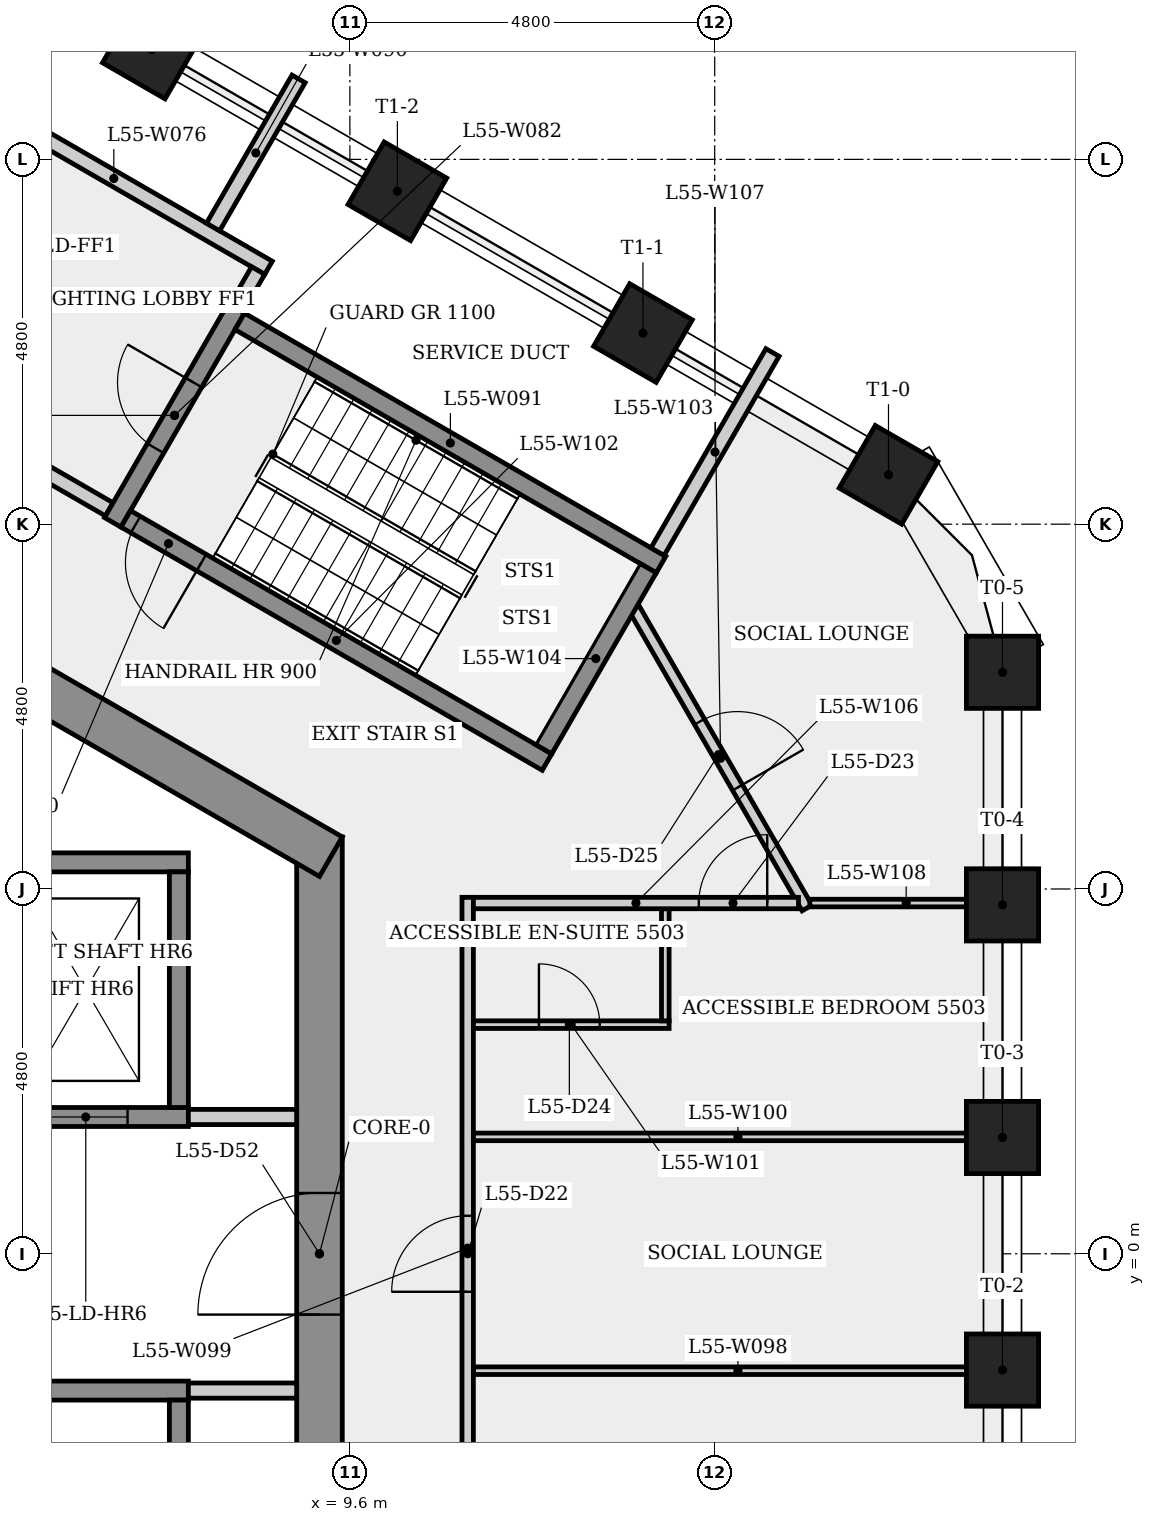
"""IFC4 building model, lengths in metres.
Left out: names, types, materials, properties, quantities, classifications, styles, units other than length and angle.
Written with IfcOpenShell. Run it as: python <this file> out.ifc"""

import sys

from ifc_helpers import new_model, si_unit, direction, frame, frame_2d, origin, origin_2d, place, context, subcontext, project, spatial, rectangle, extrude, element, fill, save


model = new_model("IFC4")
c1 = context("Model", 3, precision=1e-05, world=origin(), true_north=direction((0.0, 1.0)))
c2 = subcontext(c1, "Body", "Model", "MODEL_VIEW")
j1 = project(units=[si_unit("LENGTHUNIT", "METRE"), si_unit("PLANEANGLEUNIT", "RADIAN")], contexts=[c1])
p1 = place(None, origin())
s1 = spatial("IfcSite", under=j1, at=p1, CompositionType="ELEMENT")
p2 = place(p1, origin())
s2 = spatial("IfcBuilding", under=s1, at=p2, CompositionType="ELEMENT")
p3 = place(p2, frame((0.0, 0.0, 206.1)))
s3 = spatial("IfcBuildingStorey", under=s2, at=p3, CompositionType="ELEMENT", Elevation=206.1)
p4 = place(p3, frame((9.2, -5.485, 0.0), z_axis=(0.0, 0.0, 1.0), x_axis=(0.0, 1.0, 0.0)))
e1 = element("IfcWall", 1, at=p4, inside=s3, PredefinedType="SHEAR", context=c2, shape_type="SweptSolid", body=[
    extrude(rectangle(XDim=10.97, YDim=0.6, at=frame_2d((5.485, 0.0))), origin(), (0.0, 0.0, 1.0), 4.0),
])
p5 = place(p4, frame((4.685, 0.0, 0.0)))
e2 = element("IfcOpeningElement", 2, at=p5, cuts=e1, PredefinedType="OPENING", context=c2, shape_type="SweptSolid", body=[
    extrude(rectangle(XDim=1.6, YDim=2.1, at=frame_2d((0.8, 1.05))), frame((0.0, 0.31, 0.0), z_axis=(0.0, -1.0, 0.0), x_axis=(1.0, 0.0, 0.0)), (0.0, 0.0, 1.0), 0.62),
])
p6 = place(p3, frame((9.35, 5.225, 0.0), z_axis=(0.0, 0.0, 1.0), x_axis=(-0.866023993627, 0.500002442456, 0.0)))
e3 = element("IfcWall", 3, at=p6, inside=s3, PredefinedType="SHEAR", context=c2, shape_type="SweptSolid", body=[
    extrude(rectangle(XDim=10.97, YDim=0.6, at=frame_2d((5.485, 0.0))), origin(), (0.0, 0.0, 1.0), 4.0),
])
p7 = place(p6, frame((5.393, 0.0, 0.0)))
e4 = element("IfcOpeningElement", 4, at=p7, cuts=e3, PredefinedType="OPENING", context=c2, shape_type="SweptSolid", body=[
    extrude(rectangle(XDim=0.9, YDim=2.1, at=frame_2d((0.45, 1.05))), frame((0.0, 0.31, 0.0), z_axis=(0.0, -1.0, 0.0), x_axis=(1.0, 0.0, 0.0)), (0.0, 0.0, 1.0), 0.62),
])
for number, where, z_axis, x_axis in (
    (5, (18.187, -1.53, 0.0), (0.0, 0.0, 1.0), (1.0, 0.0, 0.0)),
    (6, (18.187, 1.53, 0.0), (0.0, 0.0, 1.0), (1.0, 0.0, 0.0)),
    (7, (18.187, 4.591, 0.0), (0.0, 0.0, 1.0), (1.0, 0.0, 0.0)),
    (8, (18.187, 7.651, 0.0), (0.0, 0.0, 1.0), (1.0, 0.0, 0.0)),
    (9, (16.687, 10.25, 0.0), (0.0, 0.0, 1.0), (0.5, 0.866, 0.0)),
    (10, (13.456, 12.115, 0.0), (0.0, 0.0, 1.0), (0.5, 0.866, 0.0)),
    (11, (10.225, 13.98, 0.0), (0.0, 0.0, 1.0), (0.5, 0.866, 0.0)),
    (12, (6.994, 15.845, 0.0), (0.0, 0.0, 1.0), (0.5, 0.866, 0.0)),
):
    element("IfcColumn", number, at=place(p3, frame(where, z_axis=z_axis, x_axis=x_axis)), inside=s3, PredefinedType="COLUMN", context=c2, shape_type="SweptSolid", body=[
        extrude(rectangle(XDim=0.95, YDim=0.95, at=origin_2d()), origin(), (0.0, 0.0, 1.0), 4.0),
    ])
p8 = place(p3, frame((-7.475, 1.8, 0.0), z_axis=(0.0, 0.0, 1.0), x_axis=(1.0, 0.0, 0.0)))
e13 = element("IfcWall", 13, at=p8, inside=s3, PredefinedType="SHEAR", context=c2, shape_type="SweptSolid", body=[
    extrude(rectangle(XDim=14.95, YDim=0.25, at=frame_2d((7.475, 0.0))), origin(), (0.0, 0.0, 1.0), 3.6),
])
p9 = place(p8, frame((0.8, 0.0, 0.0)))
e14 = element("IfcOpeningElement", 14, at=p9, cuts=e13, PredefinedType="OPENING", context=c2, shape_type="SweptSolid", body=[
    extrude(rectangle(XDim=1.1, YDim=2.1, at=frame_2d((0.55, 1.05))), frame((0.0, 0.135, 0.0), z_axis=(0.0, -1.0, 0.0), x_axis=(1.0, 0.0, 0.0)), (0.0, 0.0, 1.0), 0.27),
])
p10 = place(p8, frame((3.25, 0.0, 0.0)))
e15 = element("IfcOpeningElement", 15, at=p10, cuts=e13, PredefinedType="OPENING", context=c2, shape_type="SweptSolid", body=[
    extrude(rectangle(XDim=1.1, YDim=2.1, at=frame_2d((0.55, 1.05))), frame((0.0, 0.135, 0.0), z_axis=(0.0, -1.0, 0.0), x_axis=(1.0, 0.0, 0.0)), (0.0, 0.0, 1.0), 0.27),
])
p11 = place(p8, frame((5.7, 0.0, 0.0)))
e16 = element("IfcOpeningElement", 16, at=p11, cuts=e13, PredefinedType="OPENING", context=c2, shape_type="SweptSolid", body=[
    extrude(rectangle(XDim=1.1, YDim=2.1, at=frame_2d((0.55, 1.05))), frame((0.0, 0.135, 0.0), z_axis=(0.0, -1.0, 0.0), x_axis=(1.0, 0.0, 0.0)), (0.0, 0.0, 1.0), 0.27),
])
p12 = place(p8, frame((8.15, 0.0, 0.0)))
e17 = element("IfcOpeningElement", 17, at=p12, cuts=e13, PredefinedType="OPENING", context=c2, shape_type="SweptSolid", body=[
    extrude(rectangle(XDim=1.1, YDim=2.1, at=frame_2d((0.55, 1.05))), frame((0.0, 0.135, 0.0), z_axis=(0.0, -1.0, 0.0), x_axis=(1.0, 0.0, 0.0)), (0.0, 0.0, 1.0), 0.27),
])
p13 = place(p8, frame((10.6, 0.0, 0.0)))
e18 = element("IfcOpeningElement", 18, at=p13, cuts=e13, PredefinedType="OPENING", context=c2, shape_type="SweptSolid", body=[
    extrude(rectangle(XDim=1.1, YDim=2.1, at=frame_2d((0.55, 1.05))), frame((0.0, 0.135, 0.0), z_axis=(0.0, -1.0, 0.0), x_axis=(1.0, 0.0, 0.0)), (0.0, 0.0, 1.0), 0.27),
])
p14 = place(p8, frame((13.05, 0.0, 0.0)))
e19 = element("IfcOpeningElement", 19, at=p14, cuts=e13, PredefinedType="OPENING", context=c2, shape_type="SweptSolid", body=[
    extrude(rectangle(XDim=1.1, YDim=2.1, at=frame_2d((0.55, 1.05))), frame((0.0, 0.135, 0.0), z_axis=(0.0, -1.0, 0.0), x_axis=(1.0, 0.0, 0.0)), (0.0, 0.0, 1.0), 0.27),
])
p15 = place(p3, frame((-7.225, 5.15, 0.0), z_axis=(0.0, 0.0, 1.0), x_axis=(1.0, 0.0, 0.0)))
e20 = element("IfcWall", 20, at=p15, inside=s3, PredefinedType="SHEAR", context=c2, shape_type="SweptSolid", body=[
    extrude(rectangle(XDim=14.7, YDim=0.25, at=frame_2d((7.35, 0.0))), origin(), (0.0, 0.0, 1.0), 3.6),
])
p16 = place(p3, frame((4.459, 15.323, 0.0), z_axis=(0.0, 0.0, 1.0), x_axis=(0.866016039709, -0.500016218704, 0.0)))
e21 = element("IfcWall", 21, at=p16, inside=s3, PredefinedType="PLUMBINGWALL", context=c2, shape_type="SweptSolid", body=[
    extrude(rectangle(XDim=4.7, YDim=0.2, at=frame_2d((2.35, 0.0))), origin(), (0.0, 0.0, 1.0), 3.6),
])
p17 = place(p3, frame((2.575, -1.8, 0.0), z_axis=(0.0, 0.0, 1.0), x_axis=(1.0, 0.0, 0.0)))
e22 = element("IfcWall", 22, at=p17, inside=s3, PredefinedType="SHEAR", context=c2, shape_type="SweptSolid", body=[
    extrude(rectangle(XDim=4.9, YDim=0.25, at=frame_2d((2.45, 0.0))), origin(), (0.0, 0.0, 1.0), 3.6),
])
p18 = place(p17, frame((0.597, 0.0, 0.0)))
e23 = element("IfcOpeningElement", 23, at=p18, cuts=e22, PredefinedType="OPENING", context=c2, shape_type="SweptSolid", body=[
    extrude(rectangle(XDim=1.1, YDim=2.1, at=frame_2d((0.55, 1.05))), frame((0.0, 0.135, 0.0), z_axis=(0.0, -1.0, 0.0), x_axis=(1.0, 0.0, 0.0)), (0.0, 0.0, 1.0), 0.27),
])
p19 = place(p3, frame((6.435, 9.795, 0.0), z_axis=(0.0, 0.0, 1.0), x_axis=(-0.866012907634, 0.500021643343, 0.0)))
e24 = element("IfcWall", 24, at=p19, inside=s3, PredefinedType="PARTITIONING", context=c2, shape_type="SweptSolid", body=[
    extrude(rectangle(XDim=4.45, YDim=0.2, at=frame_2d((2.225, 0.0))), origin(), (0.0, 0.0, 1.0), 3.6),
])
p20 = place(p19, frame((1.675, 0.0, 0.0)))
e25 = element("IfcOpeningElement", 25, at=p20, cuts=e24, PredefinedType="OPENING", context=c2, shape_type="SweptSolid", body=[
    extrude(rectangle(XDim=1.1, YDim=2.1, at=frame_2d((0.55, 1.05))), frame((0.0, 0.11, 0.0), z_axis=(0.0, -1.0, 0.0), x_axis=(1.0, 0.0, 0.0)), (0.0, 0.0, 1.0), 0.22),
])
p21 = place(p3, frame((6.48, 9.624, 0.0), z_axis=(0.0, 0.0, 1.0), x_axis=(0.500017246033, 0.866015446554, 0.0)))
e26 = element("IfcWall", 26, at=p21, inside=s3, PredefinedType="SHEAR", context=c2, shape_type="SweptSolid", body=[
    extrude(rectangle(XDim=3.25, YDim=0.25, at=frame_2d((1.625, 0.0))), origin(), (0.0, 0.0, 1.0), 3.6),
])
p22 = place(p21, frame((1.125, 0.0, 0.0)))
e27 = element("IfcOpeningElement", 27, at=p22, cuts=e26, PredefinedType="OPENING", context=c2, shape_type="SweptSolid", body=[
    extrude(rectangle(XDim=1.0, YDim=2.1, at=frame_2d((0.5, 1.05))), frame((0.0, 0.135, 0.0), z_axis=(0.0, -1.0, 0.0), x_axis=(1.0, 0.0, 0.0)), (0.0, 0.0, 1.0), 0.27),
])
p23 = place(p3, frame((7.475, 1.8, 0.0), z_axis=(0.0, 0.0, 1.0), x_axis=(1.0, 0.0, 0.0)))
e28 = element("IfcWall", 28, at=p23, inside=s3, PredefinedType="PARTITIONING", context=c2, shape_type="SweptSolid", body=[
    extrude(rectangle(XDim=1.425, YDim=0.2, at=frame_2d((0.712, 0.0))), origin(), (0.0, 0.0, 1.0), 3.6),
])
for number, where, z_axis, x_axis in (
    (29, (7.35, -1.925, 0.0), (0.0, 0.0, 1.0), (0.0, -1.0, 0.0)),
    (30, (7.35, 5.025, 0.0), (0.0, 0.0, 1.0), (0.0, -1.0, 0.0)),
):
    element("IfcWall", number, at=place(p3, frame(where, z_axis=z_axis, x_axis=x_axis)), inside=s3, PredefinedType="SHEAR", context=c2, shape_type="SweptSolid", body=[
        extrude(rectangle(XDim=3.1, YDim=0.25, at=frame_2d((1.55, 0.0))), origin(), (0.0, 0.0, 1.0), 4.0),
    ])
p24 = place(p3, frame((7.8, 13.51, 0.0), z_axis=(0.0, 0.0, 1.0), x_axis=(0.500001041529, 0.866024802457, 0.0)))
e31 = element("IfcWall", 31, at=p24, inside=s3, PredefinedType="PLUMBINGWALL", context=c2, shape_type="SweptSolid", body=[
    extrude(rectangle(XDim=2.25, YDim=0.2, at=frame_2d((1.125, 0.0))), origin(), (0.0, 0.0, 1.0), 3.6),
])
p25 = place(p3, frame((8.151, 12.268, 0.0), z_axis=(0.0, 0.0, 1.0), x_axis=(0.866025499775, -0.499999833739, 0.0)))
e32 = element("IfcWall", 32, at=p25, inside=s3, PredefinedType="SHEAR", context=c2, shape_type="SweptSolid", body=[
    extrude(rectangle(XDim=6.4, YDim=0.25, at=frame_2d((3.2, 0.0))), origin(), (0.0, 0.0, 1.0), 3.6),
])
p26 = place(p3, frame((8.393, 12.937, 0.0), z_axis=(0.0, 0.0, 1.0), x_axis=(-0.500065409566, -0.86598763626, 0.0)))
e33 = element("IfcWall", 33, at=p26, inside=s3, PredefinedType="PLUMBINGWALL", context=c2, shape_type="SweptSolid", body=[
    extrude(rectangle(XDim=0.575, YDim=0.2, at=frame_2d((0.288, 0.0))), origin(), (0.0, 0.0, 1.0), 3.6),
])
p27 = place(p3, frame((8.9, -1.8, 0.0), z_axis=(0.0, 0.0, 1.0), x_axis=(-1.0, 0.0, 0.0)))
e34 = element("IfcWall", 34, at=p27, inside=s3, PredefinedType="PARTITIONING", context=c2, shape_type="SweptSolid", body=[
    extrude(rectangle(XDim=1.425, YDim=0.2, at=frame_2d((0.712, 0.0))), origin(), (0.0, 0.0, 1.0), 3.6),
])
p28 = place(p3, frame((11.225, -1.538, 0.0), z_axis=(0.0, 0.0, 1.0), x_axis=(1.0, 0.0, 0.0)))
e35 = element("IfcWall", 35, at=p28, inside=s3, PredefinedType="PARTITIONING", context=c2, shape_type="SweptSolid", body=[
    extrude(rectangle(XDim=6.961, YDim=0.1, at=frame_2d((3.481, 0.0))), origin(), (0.0, 0.0, 1.0), 3.6),
])
p29 = place(p3, frame((11.15, -4.54, 0.0), z_axis=(0.0, 0.0, 1.0), x_axis=(0.0, 1.0, 0.0)))
e36 = element("IfcWall", 36, at=p29, inside=s3, PredefinedType="PARTITIONING", context=c2, shape_type="SweptSolid", body=[
    extrude(rectangle(XDim=9.23, YDim=0.15, at=frame_2d((4.615, 0.0))), origin(), (0.0, 0.0, 1.0), 3.6),
])
p30 = place(p29, frame((4.04, 0.0, 0.0)))
e37 = element("IfcOpeningElement", 37, at=p30, cuts=e36, PredefinedType="OPENING", context=c2, shape_type="SweptSolid", body=[
    extrude(rectangle(XDim=1.0, YDim=2.1, at=frame_2d((0.5, 1.05))), frame((0.0, 0.085, 0.0), z_axis=(0.0, -1.0, 0.0), x_axis=(1.0, 0.0, 0.0)), (0.0, 0.0, 1.0), 0.17),
])
p31 = place(p3, frame((11.225, 1.538, 0.0), z_axis=(0.0, 0.0, 1.0), x_axis=(1.0, 0.0, 0.0)))
e38 = element("IfcWall", 38, at=p31, inside=s3, PredefinedType="PARTITIONING", context=c2, shape_type="SweptSolid", body=[
    extrude(rectangle(XDim=6.961, YDim=0.1, at=frame_2d((3.481, 0.0))), origin(), (0.0, 0.0, 1.0), 3.6),
])
p32 = place(p3, frame((11.225, 3.015, 0.0), z_axis=(0.0, 0.0, 1.0), x_axis=(1.0, 0.0, 0.0)))
e39 = element("IfcWall", 39, at=p32, inside=s3, PredefinedType="PARTITIONING", context=c2, shape_type="SweptSolid", body=[
    extrude(rectangle(XDim=2.575, YDim=0.1, at=frame_2d((1.288, 0.0))), origin(), (0.0, 0.0, 1.0), 3.6),
])
p33 = place(p32, frame((0.863, 0.0, 0.0)))
e40 = element("IfcOpeningElement", 40, at=p33, cuts=e39, PredefinedType="OPENING", context=c2, shape_type="SweptSolid", body=[
    extrude(rectangle(XDim=0.8, YDim=2.1, at=frame_2d((0.4, 1.05))), frame((0.0, 0.06, 0.0), z_axis=(0.0, -1.0, 0.0), x_axis=(1.0, 0.0, 0.0)), (0.0, 0.0, 1.0), 0.12),
])
p34 = place(p3, frame((12.194, 6.47, 0.0), z_axis=(0.0, 0.0, 1.0), x_axis=(-0.866025499775, 0.499999833739, 0.0)))
e41 = element("IfcWall", 41, at=p34, inside=s3, PredefinedType="SHEAR", context=c2, shape_type="SweptSolid", body=[
    extrude(rectangle(XDim=6.4, YDim=0.25, at=frame_2d((3.2, 0.0))), origin(), (0.0, 0.0, 1.0), 3.6),
])
p35 = place(p34, frame((5.25, 0.0, 0.0)))
e42 = element("IfcOpeningElement", 42, at=p35, cuts=e41, PredefinedType="OPENING", context=c2, shape_type="SweptSolid", body=[
    extrude(rectangle(XDim=1.0, YDim=2.1, at=frame_2d((0.5, 1.05))), frame((0.0, 0.135, 0.0), z_axis=(0.0, -1.0, 0.0), x_axis=(1.0, 0.0, 0.0)), (0.0, 0.0, 1.0), 0.27),
])
p36 = place(p3, frame((13.34, 8.49, 0.0), z_axis=(0.0, 0.0, 1.0), x_axis=(0.499995010897, -0.866028284225, 0.0)))
e43 = element("IfcWall", 43, at=p36, inside=s3, PredefinedType="PARTITIONING", context=c2, shape_type="SweptSolid", body=[
    extrude(rectangle(XDim=4.549, YDim=0.15, at=frame_2d((2.274, 0.0))), origin(), (0.0, 0.0, 1.0), 3.6),
])
p37 = place(p36, frame((1.719, 0.0, 0.0)))
e44 = element("IfcOpeningElement", 44, at=p37, cuts=e43, PredefinedType="OPENING", context=c2, shape_type="SweptSolid", body=[
    extrude(rectangle(XDim=1.0, YDim=2.1, at=frame_2d((0.5, 1.05))), frame((0.0, 0.085, 0.0), z_axis=(0.0, -1.0, 0.0), x_axis=(1.0, 0.0, 0.0)), (0.0, 0.0, 1.0), 0.17),
])
p38 = place(p3, frame((12.148, 6.641, 0.0), z_axis=(0.0, 0.0, 1.0), x_axis=(0.500034990121, 0.866005201286, 0.0)))
e45 = element("IfcWall", 45, at=p38, inside=s3, PredefinedType="SHEAR", context=c2, shape_type="SweptSolid", body=[
    extrude(rectangle(XDim=2.75, YDim=0.25, at=frame_2d((1.375, 0.0))), origin(), (0.0, 0.0, 1.0), 3.6),
])
p39 = place(p3, frame((13.75, 3.065, 0.0), z_axis=(0.0, 0.0, 1.0), x_axis=(0.0, 1.0, 0.0)))
e46 = element("IfcWall", 46, at=p39, inside=s3, PredefinedType="PARTITIONING", context=c2, shape_type="SweptSolid", body=[
    extrude(rectangle(XDim=1.475, YDim=0.1, at=frame_2d((0.738, 0.0))), origin(), (0.0, 0.0, 1.0), 3.6),
])
p40 = place(p3, frame((11.225, 4.615, 0.0), z_axis=(0.0, 0.0, 1.0), x_axis=(1.0, 0.0, 0.0)))
e47 = element("IfcWall", 47, at=p40, inside=s3, PredefinedType="PARTITIONING", context=c2, shape_type="SweptSolid", body=[
    extrude(rectangle(XDim=4.277, YDim=0.15, at=frame_2d((2.139, 0.0))), origin(), (0.0, 0.0, 1.0), 3.6),
])
p41 = place(p40, frame((2.966, 0.0, 0.0)))
e48 = element("IfcOpeningElement", 48, at=p41, cuts=e47, PredefinedType="OPENING", context=c2, shape_type="SweptSolid", body=[
    extrude(rectangle(XDim=0.9, YDim=2.1, at=frame_2d((0.45, 1.05))), frame((0.0, 0.085, 0.0), z_axis=(0.0, -1.0, 0.0), x_axis=(1.0, 0.0, 0.0)), (0.0, 0.0, 1.0), 0.17),
])
p42 = place(p3, frame((15.161, 11.859, 0.0), z_axis=(0.0, 0.0, 1.0), x_axis=(-0.49999255039, -0.866029704776, 0.0)))
e49 = element("IfcWall", 49, at=p42, inside=s3, PredefinedType="PLUMBINGWALL", context=c2, shape_type="SweptSolid", body=[
    extrude(rectangle(XDim=3.025, YDim=0.2, at=frame_2d((1.513, 0.0))), origin(), (0.0, 0.0, 1.0), 3.6),
])
p43 = place(p3, frame((15.652, 4.615, 0.0), z_axis=(0.0, 0.0, 1.0), x_axis=(1.0, 0.0, 0.0)))
e50 = element("IfcWall", 50, at=p43, inside=s3, PredefinedType="PARTITIONING", context=c2, shape_type="SweptSolid", body=[
    extrude(rectangle(XDim=2.534, YDim=0.1, at=frame_2d((1.267, 0.0))), origin(), (0.0, 0.0, 1.0), 3.6),
])
p44 = place(p14, origin())
e51 = element("IfcDoor", 51, at=p44, inside=s3, OperationType="SLIDING_TO_LEFT", PredefinedType="DOOR", context=c2, shape_type="SweptSolid", body=[
    extrude(rectangle(XDim=1.1, YDim=2.1, at=frame_2d((0.55, 1.05))), frame((0.0, 0.025, 0.0), z_axis=(0.0, -1.0, 0.0), x_axis=(1.0, 0.0, 0.0)), (0.0, 0.0, 1.0), 0.05),
])
fill(e19, e51)
p45 = place(p35, origin())
e52 = element("IfcDoor", 52, at=p45, inside=s3, OperationType="SINGLE_SWING_LEFT", PredefinedType="DOOR", context=c2, shape_type="SweptSolid", body=[
    extrude(rectangle(XDim=1.0, YDim=2.1, at=frame_2d((0.5, 1.05))), frame((0.0, 0.025, 0.0), z_axis=(0.0, -1.0, 0.0), x_axis=(1.0, 0.0, 0.0)), (0.0, 0.0, 1.0), 0.05),
])
fill(e42, e52)
p46 = place(p22, origin())
e53 = element("IfcDoor", 53, at=p46, inside=s3, OperationType="SINGLE_SWING_RIGHT", PredefinedType="DOOR", context=c2, shape_type="SweptSolid", body=[
    extrude(rectangle(XDim=1.0, YDim=2.1, at=frame_2d((0.5, 1.05))), frame((0.0, 0.025, 0.0), z_axis=(0.0, -1.0, 0.0), x_axis=(1.0, 0.0, 0.0)), (0.0, 0.0, 1.0), 0.05),
])
fill(e27, e53)
p47 = place(p30, origin())
e54 = element("IfcDoor", 54, at=p47, inside=s3, OperationType="SINGLE_SWING_LEFT", PredefinedType="DOOR", context=c2, shape_type="SweptSolid", body=[
    extrude(rectangle(XDim=1.0, YDim=2.1, at=frame_2d((0.5, 1.05))), frame((0.0, 0.025, 0.0), z_axis=(0.0, -1.0, 0.0), x_axis=(1.0, 0.0, 0.0)), (0.0, 0.0, 1.0), 0.05),
])
fill(e37, e54)
p48 = place(p41, origin())
e55 = element("IfcDoor", 55, at=p48, inside=s3, OperationType="SINGLE_SWING_RIGHT", PredefinedType="DOOR", context=c2, shape_type="SweptSolid", body=[
    extrude(rectangle(XDim=0.9, YDim=2.1, at=frame_2d((0.45, 1.05))), frame((0.0, 0.025, 0.0), z_axis=(0.0, -1.0, 0.0), x_axis=(1.0, 0.0, 0.0)), (0.0, 0.0, 1.0), 0.05),
])
fill(e48, e55)
p49 = place(p33, origin())
e56 = element("IfcDoor", 56, at=p49, inside=s3, OperationType="SINGLE_SWING_LEFT", PredefinedType="DOOR", context=c2, shape_type="SweptSolid", body=[
    extrude(rectangle(XDim=0.8, YDim=2.1, at=frame_2d((0.4, 1.05))), frame((0.0, 0.025, 0.0), z_axis=(0.0, -1.0, 0.0), x_axis=(1.0, 0.0, 0.0)), (0.0, 0.0, 1.0), 0.05),
])
fill(e40, e56)
p50 = place(p37, origin())
e57 = element("IfcDoor", 57, at=p50, inside=s3, OperationType="SINGLE_SWING_RIGHT", PredefinedType="DOOR", context=c2, shape_type="SweptSolid", body=[
    extrude(rectangle(XDim=1.0, YDim=2.1, at=frame_2d((0.5, 1.05))), frame((0.0, 0.025, 0.0), z_axis=(0.0, -1.0, 0.0), x_axis=(1.0, 0.0, 0.0)), (0.0, 0.0, 1.0), 0.05),
])
fill(e44, e57)
p51 = place(p5, origin())
e58 = element("IfcDoor", 58, at=p51, inside=s3, OperationType="SINGLE_SWING_LEFT", PredefinedType="DOOR", context=c2, shape_type="SweptSolid", body=[
    extrude(rectangle(XDim=1.6, YDim=2.1, at=frame_2d((0.8, 1.05))), frame((0.0, 0.025, 0.0), z_axis=(0.0, -1.0, 0.0), x_axis=(1.0, 0.0, 0.0)), (0.0, 0.0, 1.0), 0.05),
])
fill(e2, e58)
save(model, sys.argv[1])
